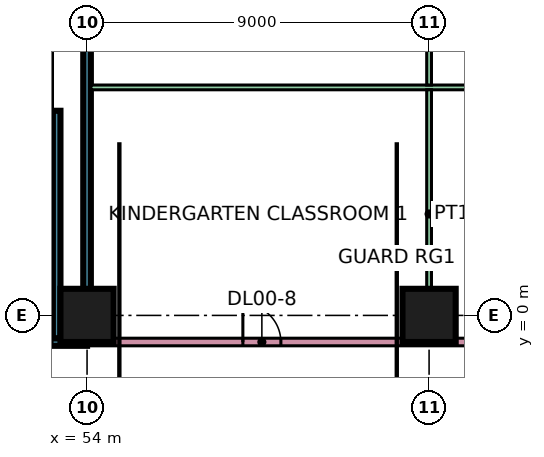
"""IFC4 building model, lengths in metres.
Left out: names, types, materials, properties, quantities, classifications, styles, units other than length and angle.
Written with IfcOpenShell. Run it as: python <this file> out.ifc"""

import sys

from ifc_helpers import new_model, si_unit, direction, frame, frame_2d, origin, origin_2d, place, context, subcontext, project, spatial, rectangle, extrude, element, fill, save


model = new_model("IFC4")
c1 = context("Model", 3, precision=1e-05, world=origin(), true_north=direction((0.0, 1.0)))
c2 = subcontext(c1, "Body", "Model", "MODEL_VIEW")
j1 = project(units=[si_unit("LENGTHUNIT", "METRE"), si_unit("PLANEANGLEUNIT", "RADIAN")], contexts=[c1])
p1 = place(None, origin())
s1 = spatial("IfcSite", under=j1, at=p1, CompositionType="ELEMENT")
p2 = place(p1, origin())
s2 = spatial("IfcBuilding", under=s1, at=p2, CompositionType="ELEMENT")
p3 = place(p2, origin())
s3 = spatial("IfcBuildingStorey", under=s2, at=p3, CompositionType="ELEMENT", Elevation=0.0)
for number, where, z_axis, x_axis in (
    (1, (54.0, 0.0, 0.0), (0.0, 0.0, 1.0), (1.0, 0.0, 0.0)),
    (2, (63.0, 0.0, 0.0), (0.0, 0.0, 1.0), (1.0, 0.0, 0.0)),
):
    element("IfcColumn", number, at=place(p3, frame(where, z_axis=z_axis, x_axis=x_axis)), inside=s3, PredefinedType="COLUMN", context=c2, shape_type="SweptSolid", body=[
        extrude(rectangle(XDim=1.4, YDim=1.4, at=origin_2d()), origin(), (0.0, 0.0, 1.0), 7.2),
    ])
p4 = place(p3, frame((45.7, -0.7, 0.0), z_axis=(0.0, 0.0, 1.0), x_axis=(1.0, 0.0, 0.0)))
e3 = element("IfcWall", 3, at=p4, inside=s3, PredefinedType="SOLIDWALL", context=c2, shape_type="SweptSolid", body=[
    extrude(rectangle(XDim=8.3, YDim=0.2, at=frame_2d((4.15, 0.0))), origin(), (0.0, 0.0, 1.0), 6.8),
])
p5 = place(p4, frame((5.1, 0.0, 0.0)))
e4 = element("IfcOpeningElement", 4, at=p5, cuts=e3, PredefinedType="OPENING", context=c2, shape_type="SweptSolid", body=[
    extrude(rectangle(XDim=1.2, YDim=2.1, at=frame_2d((0.6, 1.05))), frame((0.0, 0.11, 0.0), z_axis=(0.0, -1.0, 0.0), x_axis=(1.0, 0.0, 0.0)), (0.0, 0.0, 1.0), 0.22),
])
p6 = place(p4, frame((1.5, 0.0, 0.0)))
e5 = element("IfcOpeningElement", 5, at=p6, cuts=e3, PredefinedType="OPENING", context=c2, shape_type="SweptSolid", body=[
    extrude(rectangle(XDim=1.2, YDim=2.1, at=frame_2d((0.6, 1.05))), frame((0.0, 0.11, 0.0), z_axis=(0.0, -1.0, 0.0), x_axis=(1.0, 0.0, 0.0)), (0.0, 0.0, 1.0), 0.22),
])
p7 = place(p3, frame((54.0, -0.7, 0.0), z_axis=(0.0, 0.0, 1.0), x_axis=(1.0, 0.0, 0.0)))
e6 = element("IfcWall", 6, at=p7, inside=s3, PredefinedType="PARTITIONING", context=c2, shape_type="SweptSolid", body=[
    extrude(rectangle(XDim=21.0, YDim=0.2, at=frame_2d((10.5, 0.0))), origin(), (0.0, 0.0, 1.0), 6.8),
])
p8 = place(p7, frame((4.1, 0.0, 0.0)))
e7 = element("IfcOpeningElement", 7, at=p8, cuts=e6, PredefinedType="OPENING", context=c2, shape_type="SweptSolid", body=[
    extrude(rectangle(XDim=1.0, YDim=2.1, at=frame_2d((0.5, 1.05))), frame((0.0, 0.11, 0.0), z_axis=(0.0, -1.0, 0.0), x_axis=(1.0, 0.0, 0.0)), (0.0, 0.0, 1.0), 0.22),
])
p9 = place(p3, frame((54.0, -0.6, 0.0), z_axis=(0.0, 0.0, 1.0), x_axis=(0.0, 1.0, 0.0)))
e8 = element("IfcWall", 8, at=p9, inside=s3, PredefinedType="SOLIDWALL", context=c2, shape_type="SweptSolid", body=[
    extrude(rectangle(XDim=13.1, YDim=0.2, at=frame_2d((6.55, 0.0))), origin(), (0.0, 0.0, 1.0), 6.8),
])
p10 = place(p3, frame((54.1, 6.0, 0.0), z_axis=(0.0, 0.0, 1.0), x_axis=(1.0, 0.0, 0.0)))
e9 = element("IfcWall", 9, at=p10, inside=s3, PredefinedType="PARTITIONING", context=c2, shape_type="SweptSolid", body=[
    extrude(rectangle(XDim=17.962, YDim=0.125, at=frame_2d((8.981, 0.0))), origin(), (0.0, 0.0, 1.0), 6.8),
])
p11 = place(p3, frame((63.0, -0.6, 0.0), z_axis=(0.0, 0.0, 1.0), x_axis=(0.0, 1.0, 0.0)))
e10 = element("IfcWall", 10, at=p11, inside=s3, PredefinedType="PARTITIONING", context=c2, shape_type="SweptSolid", body=[
    extrude(rectangle(XDim=6.538, YDim=0.125, at=frame_2d((3.269, 0.0))), origin(), (0.0, 0.0, 1.0), 6.8),
])
p12 = place(p3, frame((63.0, 6.062, 0.0), z_axis=(0.0, 0.0, 1.0), x_axis=(0.0, 1.0, 0.0)))
e11 = element("IfcWall", 11, at=p12, inside=s3, PredefinedType="PARTITIONING", context=c2, shape_type="SweptSolid", body=[
    extrude(rectangle(XDim=6.438, YDim=0.125, at=frame_2d((3.219, 0.0))), origin(), (0.0, 0.0, 1.0), 6.8),
])
p13 = place(p3, frame((53.2, -0.6, 0.0), z_axis=(0.0, 0.0, 1.0), x_axis=(0.0, 1.0, 0.0)))
e12 = element("IfcWall", 12, at=p13, inside=s3, PredefinedType="SOLIDWALL", context=c2, shape_type="SweptSolid", body=[
    extrude(rectangle(XDim=5.985, YDim=0.2, at=frame_2d((2.993, 0.0))), origin(), (0.0, 0.0, 1.0), 6.8),
])
p14 = place(p8, origin())
e13 = element("IfcDoor", 13, at=p14, inside=s3, OperationType="SINGLE_SWING_LEFT", PredefinedType="DOOR", context=c2, shape_type="SweptSolid", body=[
    extrude(rectangle(XDim=1.0, YDim=2.1, at=frame_2d((0.5, 1.05))), frame((0.0, 0.025, 0.0), z_axis=(0.0, -1.0, 0.0), x_axis=(1.0, 0.0, 0.0)), (0.0, 0.0, 1.0), 0.05),
])
fill(e7, e13)
save(model, sys.argv[1])
